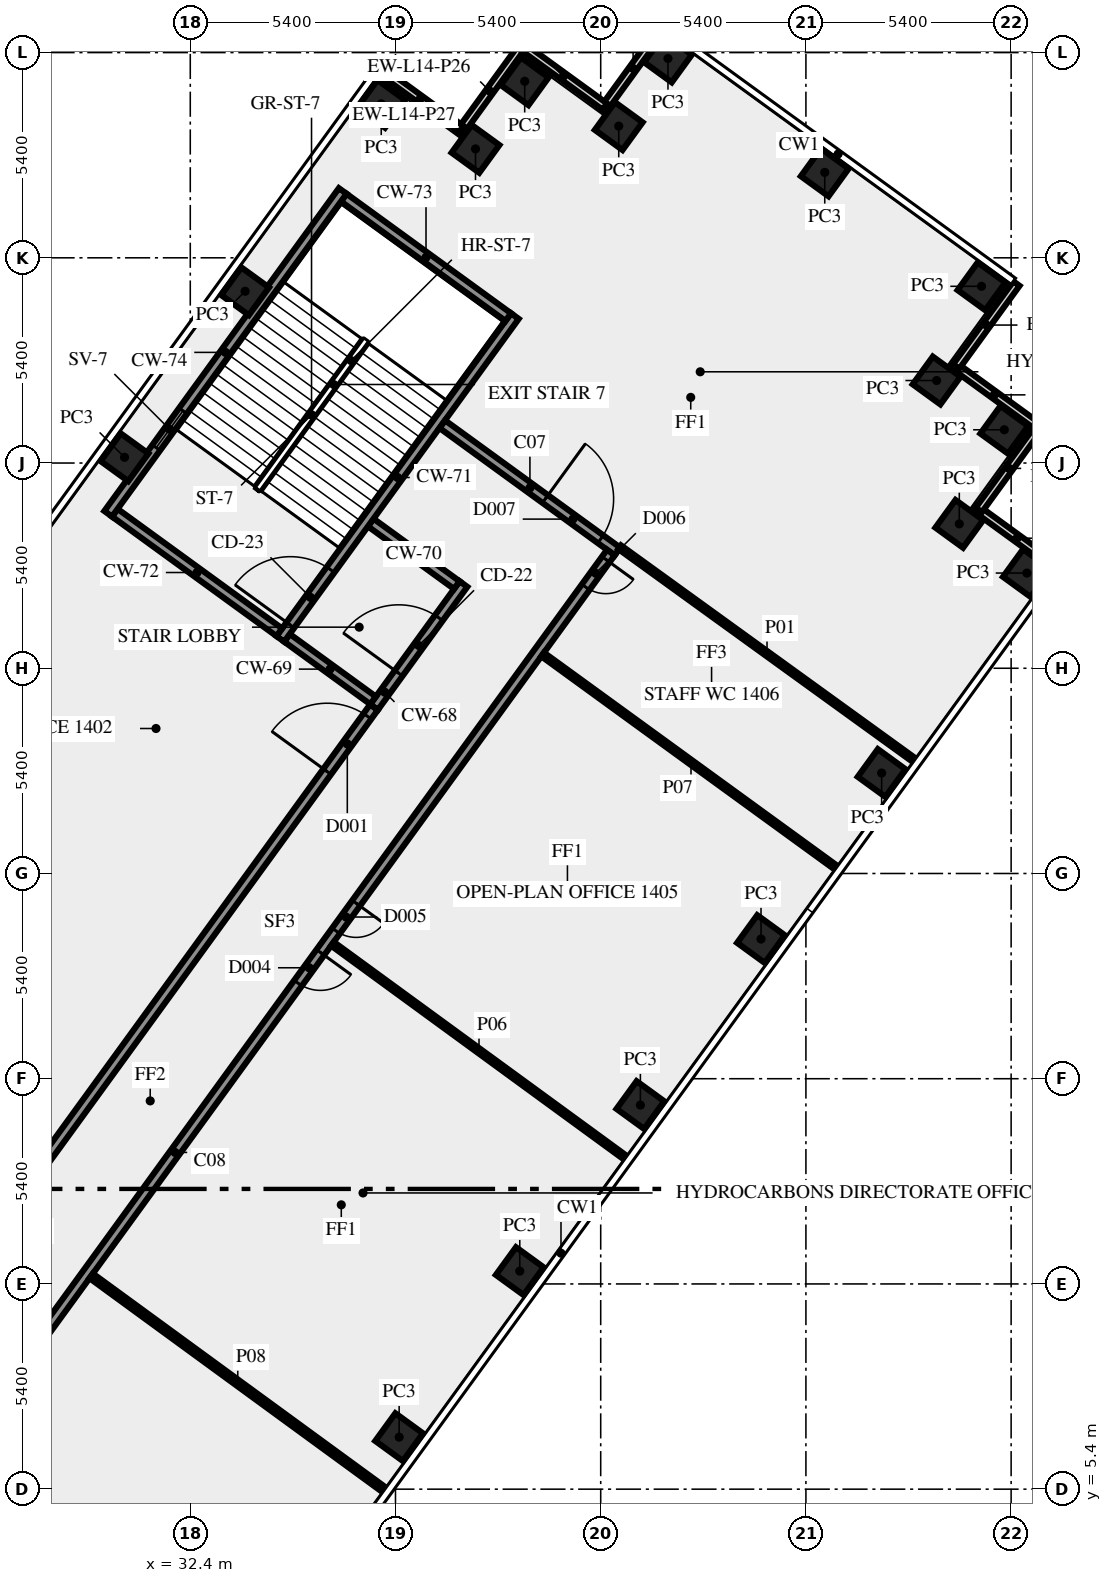
"""IFC4 building model, lengths in metres.
Left out: names, types, materials, properties, quantities, classifications, styles, units other than length and angle.
Written with IfcOpenShell. Run it as: python <this file> out.ifc"""

import sys

from ifc_helpers import new_model, si_unit, direction, frame, frame_2d, origin, origin_2d, place, context, subcontext, project, spatial, rectangle, extrude, element, fill, save


model = new_model("IFC4")
c1 = context("Model", 3, precision=1e-05, world=origin(), true_north=direction((0.0, 1.0)))
c2 = subcontext(c1, "Body", "Model", "MODEL_VIEW")
j1 = project(units=[si_unit("LENGTHUNIT", "METRE"), si_unit("PLANEANGLEUNIT", "RADIAN")], contexts=[c1])
p1 = place(None, origin())
s1 = spatial("IfcSite", under=j1, at=p1, CompositionType="ELEMENT")
p2 = place(p1, origin())
s2 = spatial("IfcBuilding", under=s1, at=p2, CompositionType="ELEMENT")
p3 = place(p2, frame((0.0, 0.0, 63.0)))
s3 = spatial("IfcBuildingStorey", under=s2, at=p3, CompositionType="ELEMENT", Elevation=63.0)
for number, where, z_axis, x_axis in (
    (1, (37.896, 6.769, 0.0), (0.0, 0.0, 1.0), (0.588, 0.809, 0.0)),
    (2, (41.07, 11.137, 0.0), (0.0, 0.0, 1.0), (0.588, 0.809, 0.0)),
    (3, (44.244, 15.506, 0.0), (0.0, 0.0, 1.0), (0.588, 0.809, 0.0)),
    (4, (47.418, 19.875, 0.0), (0.0, 0.0, 1.0), (0.588, 0.809, 0.0)),
    (5, (50.592, 24.243, 0.0), (0.0, 0.0, 1.0), (0.588, 0.809, 0.0)),
    (6, (54.415, 29.505, 0.0), (0.0, 0.0, 1.0), (0.588, 0.809, 0.0)),
    (7, (52.636, 30.8, 0.0), (0.0, 0.0, 1.0), (-0.809, 0.588, 0.0)),
    (8, (53.82, 33.275, 0.0), (0.0, 0.0, 1.0), (-0.809, 0.588, 0.0)),
    (9, (52.039, 34.571, 0.0), (0.0, 0.0, 1.0), (0.588, 0.809, 0.0)),
    (10, (53.22, 37.05, 0.0), (0.0, 0.0, 1.0), (-0.809, 0.588, 0.0)),
    (11, (49.096, 40.047, 0.0), (0.0, 0.0, 1.0), (-0.809, 0.588, 0.0)),
    (12, (44.97, 43.045, 0.0), (0.0, 0.0, 1.0), (-0.809, 0.588, 0.0)),
    (13, (43.675, 41.265, 0.0), (0.0, 0.0, 1.0), (-0.809, 0.588, 0.0)),
    (14, (41.2, 42.445, 0.0), (0.0, 0.0, 1.0), (-0.588, -0.809, 0.0)),
    (15, (39.906, 40.666, 0.0), (0.0, 0.0, 1.0), (-0.588, -0.809, 0.0)),
    (16, (37.425, 41.85, 0.0), (0.0, 0.0, 1.0), (-0.588, -0.809, 0.0)),
    (17, (33.843, 36.919, 0.0), (0.0, 0.0, 1.0), (-0.588, -0.809, 0.0)),
    (18, (30.669, 32.55, 0.0), (0.0, 0.0, 1.0), (-0.588, -0.809, 0.0)),
):
    element("IfcColumn", number, at=place(p3, frame(where, z_axis=z_axis, x_axis=x_axis)), inside=s3, PredefinedType="COLUMN", context=c2, shape_type="SweptSolid", body=[
        extrude(rectangle(XDim=0.9, YDim=0.9, at=origin_2d()), origin(), (0.0, 0.0, 1.0), 3.65),
    ])
p4 = place(p3, frame((55.247, 29.629, 0.0), z_axis=(0.0, 0.0, 1.0), x_axis=(-0.809033161865, 0.587762999008, 0.0)))
e19 = element("IfcWall", 19, at=p4, inside=s3, PredefinedType="SOLIDWALL", context=c2, shape_type="SweptSolid", body=[
    extrude(rectangle(XDim=2.7, YDim=0.2, at=frame_2d((1.35, 0.0))), origin(), (0.0, 0.0, 1.0), 3.65),
])
p5 = place(p3, frame((53.151, 31.167, 0.0), z_axis=(0.0, 0.0, 1.0), x_axis=(0.587779184282, 0.809021403008, 0.0)))
e20 = element("IfcWall", 20, at=p5, inside=s3, PredefinedType="SOLIDWALL", context=c2, shape_type="SweptSolid", body=[
    extrude(rectangle(XDim=2.7, YDim=0.2, at=frame_2d((1.35, 0.0))), origin(), (0.0, 0.0, 1.0), 3.65),
])
for number, where, z_axis, x_axis in (
    (21, (54.65, 33.4, 0.0), (0.0, 0.0, 1.0), (-0.809, 0.588, 0.0)),
    (22, (52.553, 34.938, 0.0), (0.0, 0.0, 1.0), (0.588, 0.809, 0.0)),
    (23, (44.846, 43.875, 0.0), (0.0, 0.0, 1.0), (-0.588, -0.809, 0.0)),
    (24, (43.308, 41.779, 0.0), (0.0, 0.0, 1.0), (-0.809, 0.588, 0.0)),
):
    element("IfcWall", number, at=place(p3, frame(where, z_axis=z_axis, x_axis=x_axis)), inside=s3, PredefinedType="SOLIDWALL", context=c2, shape_type="SweptSolid", body=[
        extrude(rectangle(XDim=2.7, YDim=0.2, at=frame_2d((1.35, 0.0))), origin(), (0.0, 0.0, 1.0), 3.65),
    ])
p6 = place(p3, frame((41.075, 43.278, 0.0), z_axis=(0.0, 0.0, 1.0), x_axis=(-0.587806000234, -0.809001919707, 0.0)))
e25 = element("IfcWall", 25, at=p6, inside=s3, PredefinedType="SOLIDWALL", context=c2, shape_type="SweptSolid", body=[
    extrude(rectangle(XDim=2.7, YDim=0.2, at=frame_2d((1.35, 0.0))), origin(), (0.0, 0.0, 1.0), 3.65),
])
p7 = place(p3, frame((39.537, 41.181, 0.0), z_axis=(0.0, 0.0, 1.0), x_axis=(-0.809033161865, 0.587762999008, 0.0)))
e26 = element("IfcWall", 26, at=p7, inside=s3, PredefinedType="SOLIDWALL", context=c2, shape_type="SweptSolid", body=[
    extrude(rectangle(XDim=2.7, YDim=0.2, at=frame_2d((1.35, 0.0))), origin(), (0.0, 0.0, 1.0), 3.65),
])
p8 = place(p3, frame((37.238, 25.98, 0.0), z_axis=(0.0, 0.0, 1.0), x_axis=(0.587772420479, 0.809026317077, 0.0)))
e27 = element("IfcWall", 27, at=p8, inside=s3, PredefinedType="SHEAR", context=c2, shape_type="SweptSolid", body=[
    extrude(rectangle(XDim=4.0, YDim=0.25, at=frame_2d((2.0, 0.0))), origin(), (0.0, 0.0, 1.0), 3.65),
])
p9 = place(p8, frame((1.1, 0.0, 0.0)))
e28 = element("IfcOpeningElement", 28, at=p9, cuts=e27, PredefinedType="OPENING", context=c2, shape_type="SweptSolid", body=[
    extrude(rectangle(XDim=1.8, YDim=2.1, at=frame_2d((0.9, 1.05))), frame((0.0, 0.135, 0.0), z_axis=(0.0, -1.0, 0.0), x_axis=(1.0, 0.0, 0.0)), (0.0, 0.0, 1.0), 0.27),
])
for number, where, z_axis, x_axis in (
    (29, (37.21, 26.154, 0.0), (0.0, 0.0, 1.0), (-0.809, 0.588, 0.0)),
    (30, (39.414, 29.188, 0.0), (0.0, 0.0, 1.0), (-0.809, 0.588, 0.0)),
):
    element("IfcWall", number, at=place(p3, frame(where, z_axis=z_axis, x_axis=x_axis)), inside=s3, PredefinedType="SHEAR", context=c2, shape_type="SweptSolid", body=[
        extrude(rectangle(XDim=2.8, YDim=0.25, at=frame_2d((1.4, 0.0))), origin(), (0.0, 0.0, 1.0), 3.65),
    ])
p10 = place(p3, frame((34.77, 27.772, 0.0), z_axis=(0.0, 0.0, 1.0), x_axis=(0.587795589702, 0.809009483706, 0.0)))
e31 = element("IfcWall", 31, at=p10, inside=s3, PredefinedType="SHEAR", context=c2, shape_type="SweptSolid", body=[
    extrude(rectangle(XDim=10.5, YDim=0.25, at=frame_2d((5.25, 0.0))), origin(), (0.0, 0.0, 1.0), 3.65),
])
p11 = place(p10, frame((0.45, 0.0, 0.0)))
e32 = element("IfcOpeningElement", 32, at=p11, cuts=e31, PredefinedType="OPENING", context=c2, shape_type="SweptSolid", body=[
    extrude(rectangle(XDim=1.8, YDim=2.1, at=frame_2d((0.9, 1.05))), frame((0.0, 0.135, 0.0), z_axis=(0.0, -1.0, 0.0), x_axis=(1.0, 0.0, 0.0)), (0.0, 0.0, 1.0), 0.27),
])
p12 = place(p3, frame((34.742, 27.947, 0.0), z_axis=(0.0, 0.0, 1.0), x_axis=(-0.8089984606, 0.587810760999, 0.0)))
e33 = element("IfcWall", 33, at=p12, inside=s3, PredefinedType="SHEAR", context=c2, shape_type="SweptSolid", body=[
    extrude(rectangle(XDim=5.35, YDim=0.25, at=frame_2d((2.675, 0.0))), origin(), (0.0, 0.0, 1.0), 3.65),
])
p13 = place(p3, frame((40.767, 36.24, 0.0), z_axis=(0.0, 0.0, 1.0), x_axis=(-0.809020161303, 0.587780893365, 0.0)))
e34 = element("IfcWall", 34, at=p13, inside=s3, PredefinedType="SHEAR", context=c2, shape_type="SweptSolid", body=[
    extrude(rectangle(XDim=5.35, YDim=0.25, at=frame_2d((2.675, 0.0))), origin(), (0.0, 0.0, 1.0), 3.65),
])
p14 = place(p3, frame((30.24, 31.064, 0.0), z_axis=(0.0, 0.0, 1.0), x_axis=(0.587795589702, 0.809009483706, 0.0)))
e35 = element("IfcWall", 35, at=p14, inside=s3, PredefinedType="SHEAR", context=c2, shape_type="SweptSolid", body=[
    extrude(rectangle(XDim=10.5, YDim=0.25, at=frame_2d((5.25, 0.0))), origin(), (0.0, 0.0, 1.0), 3.65),
])
p15 = place(p14, frame((2.15, 0.0, 1.0)))
e36 = element("IfcOpeningElement", 36, at=p15, cuts=e35, PredefinedType="OPENING", context=c2, shape_type="SweptSolid", body=[
    extrude(rectangle(XDim=1.2, YDim=1.2, at=frame_2d((0.6, 0.6))), frame((0.0, 0.135, 0.0), z_axis=(0.0, -1.0, 0.0), x_axis=(1.0, 0.0, 0.0)), (0.0, 0.0, 1.0), 0.27),
])
p16 = place(p3, frame((17.545, -1.125, 0.0), z_axis=(0.0, 0.0, 1.0), x_axis=(0.587786323093, 0.809016216391, 0.0)))
e37 = element("IfcWall", 37, at=p16, inside=s3, PredefinedType="SOLIDWALL", context=c2, shape_type="SweptSolid", body=[
    extrude(rectangle(XDim=33.493, YDim=0.25, at=frame_2d((16.747, 0.0))), origin(), (0.0, 0.0, 1.0), 3.65),
])
p17 = place(p16, frame((31.403, 0.0, 0.0)))
e38 = element("IfcOpeningElement", 38, at=p17, cuts=e37, PredefinedType="OPENING", context=c2, shape_type="SweptSolid", body=[
    extrude(rectangle(XDim=1.8, YDim=2.1, at=frame_2d((0.9, 1.05))), frame((0.0, 0.135, 0.0), z_axis=(0.0, -1.0, 0.0), x_axis=(1.0, 0.0, 0.0)), (0.0, 0.0, 1.0), 0.27),
])
p18 = place(p16, frame((3.392, 0.0, 0.0)))
e39 = element("IfcOpeningElement", 39, at=p18, cuts=e37, PredefinedType="OPENING", context=c2, shape_type="SweptSolid", body=[
    extrude(rectangle(XDim=1.8, YDim=2.1, at=frame_2d((0.9, 1.05))), frame((0.0, 0.135, 0.0), z_axis=(0.0, -1.0, 0.0), x_axis=(1.0, 0.0, 0.0)), (0.0, 0.0, 1.0), 0.27),
])
p19 = place(p3, frame((39.034, 33.42, 0.0), z_axis=(0.0, 0.0, 1.0), x_axis=(0.809023325802, -0.587776537732, 0.0)))
e40 = element("IfcWall", 40, at=p19, inside=s3, PredefinedType="SOLIDWALL", context=c2, shape_type="SweptSolid", body=[
    extrude(rectangle(XDim=5.695, YDim=0.25, at=frame_2d((2.848, 0.0))), origin(), (0.0, 0.0, 1.0), 3.65),
])
p20 = place(p19, frame((3.345, 0.0, 0.0)))
e41 = element("IfcOpeningElement", 41, at=p20, cuts=e40, PredefinedType="OPENING", context=c2, shape_type="SweptSolid", body=[
    extrude(rectangle(XDim=1.8, YDim=2.1, at=frame_2d((0.9, 1.05))), frame((0.0, 0.135, 0.0), z_axis=(0.0, -1.0, 0.0), x_axis=(1.0, 0.0, 0.0)), (0.0, 0.0, 1.0), 0.27),
])
p21 = place(p3, frame((43.467, 30.045, 0.0), z_axis=(0.0, 0.0, 1.0), x_axis=(-0.587784726077, -0.809017376692, 0.0)))
e42 = element("IfcWall", 42, at=p21, inside=s3, PredefinedType="SOLIDWALL", context=c2, shape_type="SweptSolid", body=[
    extrude(rectangle(XDim=39.02, YDim=0.25, at=frame_2d((19.51, 0.0))), origin(), (0.0, 0.0, 1.0), 3.65),
])
p22 = place(p21, frame((11.404, 0.0, 0.0)))
e43 = element("IfcOpeningElement", 43, at=p22, cuts=e42, PredefinedType="OPENING", context=c2, shape_type="SweptSolid", body=[
    extrude(rectangle(XDim=0.9, YDim=2.1, at=frame_2d((0.45, 1.05))), frame((0.0, 0.135, 0.0), z_axis=(0.0, -1.0, 0.0), x_axis=(1.0, 0.0, 0.0)), (0.0, 0.0, 1.0), 0.27),
])
p23 = place(p21, frame((13.004, 0.0, 0.0)))
e44 = element("IfcOpeningElement", 44, at=p23, cuts=e42, PredefinedType="OPENING", context=c2, shape_type="SweptSolid", body=[
    extrude(rectangle(XDim=1.0, YDim=2.1, at=frame_2d((0.5, 1.05))), frame((0.0, 0.135, 0.0), z_axis=(0.0, -1.0, 0.0), x_axis=(1.0, 0.0, 0.0)), (0.0, 0.0, 1.0), 0.27),
])
p24 = place(p21, frame((37.287, 0.0, 0.0)))
e45 = element("IfcOpeningElement", 45, at=p24, cuts=e42, PredefinedType="OPENING", context=c2, shape_type="SweptSolid", body=[
    extrude(rectangle(XDim=1.2, YDim=2.1, at=frame_2d((0.6, 1.05))), frame((0.0, 0.135, 0.0), z_axis=(0.0, -1.0, 0.0), x_axis=(1.0, 0.0, 0.0)), (0.0, 0.0, 1.0), 0.27),
])
p25 = place(p21, frame((0.224, 0.0, 0.0)))
e46 = element("IfcOpeningElement", 46, at=p25, cuts=e42, PredefinedType="OPENING", context=c2, shape_type="SweptSolid", body=[
    extrude(rectangle(XDim=0.9, YDim=2.1, at=frame_2d((0.45, 1.05))), frame((0.0, 0.135, 0.0), z_axis=(0.0, -1.0, 0.0), x_axis=(1.0, 0.0, 0.0)), (0.0, 0.0, 1.0), 0.27),
])
p26 = place(p3, frame((43.698, 30.185, 0.0), z_axis=(0.0, 0.0, 1.0), x_axis=(0.810419489461, -0.58585002441, 0.0)))
e47 = element("IfcWall", 47, at=p26, inside=s3, PredefinedType="PARTITIONING", context=c2, shape_type="SweptSolid", body=[
    extrude(rectangle(XDim=9.57, YDim=0.12, at=frame_2d((4.785, 0.0))), origin(), (0.0, 0.0, 1.0), 2.75),
])
p27 = place(p3, frame((36.141, 19.749, 0.0), z_axis=(0.0, 0.0, 1.0), x_axis=(0.807691251741, -0.589605666408, 0.0)))
e48 = element("IfcWall", 48, at=p27, inside=s3, PredefinedType="PARTITIONING", context=c2, shape_type="SweptSolid", body=[
    extrude(rectangle(XDim=9.55, YDim=0.12, at=frame_2d((4.775, 0.0))), origin(), (0.0, 0.0, 1.0), 2.75),
])
p28 = place(p3, frame((49.48, 21.69, 0.0), z_axis=(0.0, 0.0, 1.0), x_axis=(-0.808999631097, 0.587809150052, 0.0)))
e49 = element("IfcWall", 49, at=p28, inside=s3, PredefinedType="PARTITIONING", context=c2, shape_type="SweptSolid", body=[
    extrude(rectangle(XDim=9.651, YDim=0.12, at=frame_2d((4.826, 0.0))), origin(), (0.0, 0.0, 1.0), 2.75),
])
p29 = place(p3, frame((29.793, 11.012, 0.0), z_axis=(0.0, 0.0, 1.0), x_axis=(0.807645841498, -0.589667868135, 0.0)))
e50 = element("IfcWall", 50, at=p29, inside=s3, PredefinedType="PARTITIONING", context=c2, shape_type="SweptSolid", body=[
    extrude(rectangle(XDim=9.551, YDim=0.15, at=frame_2d((4.775, 0.0))), origin(), (0.0, 0.0, 1.0), 2.75),
])
p30 = place(p9, origin())
e51 = element("IfcDoor", 51, at=p30, inside=s3, OperationType="DOUBLE_DOOR_SINGLE_SWING", PredefinedType="DOOR", context=c2, shape_type="SweptSolid", body=[
    extrude(rectangle(XDim=1.8, YDim=2.1, at=frame_2d((0.9, 1.05))), frame((0.0, 0.025, 0.0), z_axis=(0.0, -1.0, 0.0), x_axis=(1.0, 0.0, 0.0)), (0.0, 0.0, 1.0), 0.05),
])
fill(e28, e51)
p31 = place(p11, origin())
e52 = element("IfcDoor", 52, at=p31, inside=s3, OperationType="DOUBLE_DOOR_SINGLE_SWING", PredefinedType="DOOR", context=c2, shape_type="SweptSolid", body=[
    extrude(rectangle(XDim=1.8, YDim=2.1, at=frame_2d((0.9, 1.05))), frame((0.0, 0.025, 0.0), z_axis=(0.0, -1.0, 0.0), x_axis=(1.0, 0.0, 0.0)), (0.0, 0.0, 1.0), 0.05),
])
fill(e32, e52)
p32 = place(p15, origin())
e53 = element("IfcWindow", 53, at=p32, inside=s3, PartitioningType="SINGLE_PANEL", PredefinedType="WINDOW", context=c2, shape_type="SweptSolid", body=[
    extrude(rectangle(XDim=1.2, YDim=1.2, at=frame_2d((0.6, 0.6))), frame((0.0, 0.03, 0.0), z_axis=(0.0, -1.0, 0.0), x_axis=(1.0, 0.0, 0.0)), (0.0, 0.0, 1.0), 0.06),
])
fill(e36, e53)
p33 = place(p17, origin())
e54 = element("IfcDoor", 54, at=p33, inside=s3, OperationType="DOUBLE_DOOR_SINGLE_SWING", PredefinedType="DOOR", context=c2, shape_type="SweptSolid", body=[
    extrude(rectangle(XDim=1.8, YDim=2.1, at=frame_2d((0.9, 1.05))), frame((0.0, 0.025, 0.0), z_axis=(0.0, -1.0, 0.0), x_axis=(1.0, 0.0, 0.0)), (0.0, 0.0, 1.0), 0.05),
])
fill(e38, e54)
p34 = place(p20, origin())
e55 = element("IfcDoor", 55, at=p34, inside=s3, OperationType="DOUBLE_DOOR_SINGLE_SWING", PredefinedType="DOOR", context=c2, shape_type="SweptSolid", body=[
    extrude(rectangle(XDim=1.8, YDim=2.1, at=frame_2d((0.9, 1.05))), frame((0.0, 0.025, 0.0), z_axis=(0.0, -1.0, 0.0), x_axis=(1.0, 0.0, 0.0)), (0.0, 0.0, 1.0), 0.05),
])
fill(e41, e55)
p35 = place(p22, origin())
e56 = element("IfcDoor", 56, at=p35, inside=s3, OperationType="SINGLE_SWING_RIGHT", PredefinedType="DOOR", context=c2, shape_type="SweptSolid", body=[
    extrude(rectangle(XDim=0.9, YDim=2.1, at=frame_2d((0.45, 1.05))), frame((0.0, 0.025, 0.0), z_axis=(0.0, -1.0, 0.0), x_axis=(1.0, 0.0, 0.0)), (0.0, 0.0, 1.0), 0.05),
])
fill(e43, e56)
p36 = place(p23, origin())
e57 = element("IfcDoor", 57, at=p36, inside=s3, OperationType="SINGLE_SWING_LEFT", PredefinedType="DOOR", context=c2, shape_type="SweptSolid", body=[
    extrude(rectangle(XDim=1.0, YDim=2.1, at=frame_2d((0.5, 1.05))), frame((0.0, 0.025, 0.0), z_axis=(0.0, -1.0, 0.0), x_axis=(1.0, 0.0, 0.0)), (0.0, 0.0, 1.0), 0.05),
])
fill(e44, e57)
p37 = place(p25, origin())
e58 = element("IfcDoor", 58, at=p37, inside=s3, OperationType="SINGLE_SWING_LEFT", PredefinedType="DOOR", context=c2, shape_type="SweptSolid", body=[
    extrude(rectangle(XDim=0.9, YDim=2.1, at=frame_2d((0.45, 1.05))), frame((0.0, 0.025, 0.0), z_axis=(0.0, -1.0, 0.0), x_axis=(1.0, 0.0, 0.0)), (0.0, 0.0, 1.0), 0.05),
])
fill(e46, e58)
save(model, sys.argv[1])
